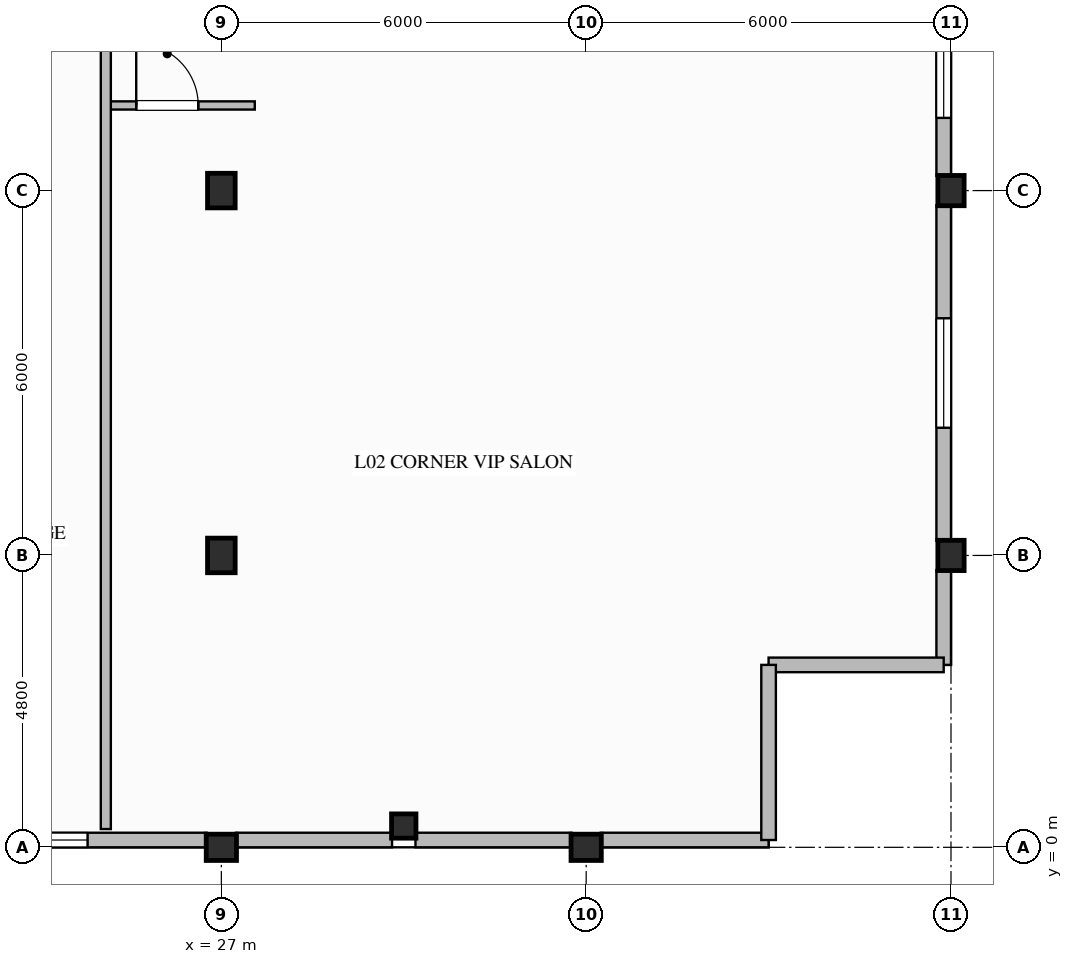
"""IFC4 building model, lengths in metres.
Left out: names, types, materials, properties, quantities, classifications, styles, units other than length and angle.
Written with IfcOpenShell. Run it as: python <this file> out.ifc"""

import sys

from ifc_helpers import new_model, si_unit, direction, frame, frame_2d, origin, origin_2d, place, context, subcontext, project, spatial, rectangle, i_section, extrude, element, fill, save


model = new_model("IFC4")
c1 = context("Model", 3, precision=1e-05, world=origin(), true_north=direction((0.0, 1.0)))
c2 = subcontext(c1, "Body", "Model", "MODEL_VIEW")
j1 = project(units=[si_unit("LENGTHUNIT", "METRE"), si_unit("PLANEANGLEUNIT", "RADIAN")], contexts=[c1])
p1 = place(None, origin())
s1 = spatial("IfcSite", under=j1, at=p1, CompositionType="ELEMENT")
p2 = place(p1, origin())
s2 = spatial("IfcBuilding", under=s1, at=p2, CompositionType="ELEMENT")
p3 = place(p2, frame((0.0, 0.0, 10.8)))
s3 = spatial("IfcBuildingStorey", under=s2, at=p3, CompositionType="ELEMENT", Elevation=10.8)
for number, where, z_axis, x_axis in (
    (1, (39.0, 4.8, 0.0), (0.0, 0.0, 1.0), (1.0, 0.0, 0.0)),
    (2, (39.0, 10.8, 0.0), (0.0, 0.0, 1.0), (1.0, 0.0, 0.0)),
    (3, (27.0, 0.0, 0.0), (0.0, 0.0, 1.0), (0.0, 1.0, 0.0)),
    (4, (33.0, 0.0, 0.0), (0.0, 0.0, 1.0), (0.0, 1.0, 0.0)),
):
    element("IfcColumn", number, at=place(p3, frame(where, z_axis=z_axis, x_axis=x_axis)), inside=s3, PredefinedType="COLUMN", context=c2, shape_type="SweptSolid", body=[
        extrude(i_section(OverallWidth=0.432, OverallDepth=0.498, WebThickness=0.056, FlangeThickness=0.089, FilletRadius=0.03, at=origin_2d()), origin(), (0.0, 0.0, 1.0), 6.4),
    ])
for number, where, z_axis, x_axis in (
    (5, (27.0, 4.8, 0.0), (0.0, 0.0, 1.0), (1.0, 0.0, 0.0)),
    (6, (27.0, 10.8, 0.0), (0.0, 0.0, 1.0), (1.0, 0.0, 0.0)),
):
    element("IfcColumn", number, at=place(p3, frame(where, z_axis=z_axis, x_axis=x_axis)), inside=s3, PredefinedType="COLUMN", context=c2, shape_type="SweptSolid", body=[
        extrude(i_section(OverallWidth=0.454, OverallDepth=0.569, WebThickness=0.078, FlangeThickness=0.125, FilletRadius=0.03, at=origin_2d()), origin(), (0.0, 0.0, 1.0), 6.4),
    ])
p4 = place(p3, frame((30.0, 0.35, 0.0), z_axis=(0.0, 0.0, 1.0), x_axis=(1.0, 0.0, 0.0)))
e7 = element("IfcColumn", 7, at=p4, inside=s3, PredefinedType="COLUMN", context=c2, shape_type="SweptSolid", body=[
    extrude(i_section(OverallWidth=0.401, OverallDepth=0.399, WebThickness=0.025, FlangeThickness=0.04, FilletRadius=0.025, at=origin_2d()), origin(), (0.0, 0.0, 1.0), 6.4),
])
p5 = place(p3, frame((38.88, 4.559, 0.0), z_axis=(0.0, 0.0, 1.0), x_axis=(0.0, -1.0, 0.0)))
e8 = element("IfcWall", 8, at=p5, inside=s3, PredefinedType="STANDARD", context=c2, shape_type="SweptSolid", body=[
    extrude(rectangle(XDim=1.559, YDim=0.24, at=frame_2d((0.78, 0.0))), origin(), (0.0, 0.0, 1.0), 6.1),
])
p6 = place(p3, frame((38.88, 10.559, 0.0), z_axis=(0.0, 0.0, 1.0), x_axis=(0.0, -1.0, 0.0)))
e9 = element("IfcWall", 9, at=p6, inside=s3, PredefinedType="STANDARD", context=c2, shape_type="SweptSolid", body=[
    extrude(rectangle(XDim=5.518, YDim=0.24, at=frame_2d((2.759, 0.0))), origin(), (0.0, 0.0, 1.0), 5.404),
])
p7 = place(p6, frame((1.859, 0.0, 0.85)))
e10 = element("IfcOpeningElement", 10, at=p7, cuts=e9, PredefinedType="OPENING", context=c2, shape_type="SweptSolid", body=[
    extrude(rectangle(XDim=1.8, YDim=2.2, at=frame_2d((0.9, 1.1))), frame((0.0, 0.13, 0.0), z_axis=(0.0, -1.0, 0.0), x_axis=(1.0, 0.0, 0.0)), (0.0, 0.0, 1.0), 0.26),
])
p8 = place(p3, frame((38.88, 14.75, 0.0), z_axis=(0.0, 0.0, 1.0), x_axis=(0.0, -1.0, 0.0)))
e11 = element("IfcWall", 11, at=p8, inside=s3, PredefinedType="STANDARD", context=c2, shape_type="SweptSolid", body=[
    extrude(rectangle(XDim=3.709, YDim=0.24, at=frame_2d((1.854, 0.0))), origin(), (0.0, 0.0, 1.0), 5.404),
])
p9 = place(p8, frame((0.955, 0.0, 0.85)))
e12 = element("IfcOpeningElement", 12, at=p9, cuts=e11, PredefinedType="OPENING", context=c2, shape_type="SweptSolid", body=[
    extrude(rectangle(XDim=1.8, YDim=2.2, at=frame_2d((0.9, 1.1))), frame((0.0, 0.13, 0.0), z_axis=(0.0, -1.0, 0.0), x_axis=(1.0, 0.0, 0.0)), (0.0, 0.0, 1.0), 0.26),
])
p10 = place(p3, frame((26.759, 0.12, 0.0), z_axis=(0.0, 0.0, 1.0), x_axis=(-1.0, 0.0, 0.0)))
e13 = element("IfcWall", 13, at=p10, inside=s3, PredefinedType="STANDARD", context=c2, shape_type="SweptSolid", body=[
    extrude(rectangle(XDim=4.318, YDim=0.24, at=frame_2d((2.159, 0.0))), origin(), (0.0, 0.0, 1.0), 5.404),
])
p11 = place(p10, frame((1.959, 0.0, 0.65)))
e14 = element("IfcOpeningElement", 14, at=p11, cuts=e13, PredefinedType="OPENING", context=c2, shape_type="SweptSolid", body=[
    extrude(rectangle(XDim=1.8, YDim=2.2, at=frame_2d((0.9, 1.1))), frame((0.0, 0.13, 0.0), z_axis=(0.0, -1.0, 0.0), x_axis=(1.0, 0.0, 0.0)), (0.0, 0.0, 1.0), 0.26),
])
for number, where, z_axis, x_axis in (
    (15, (29.807, 0.12, 0.0), (0.0, 0.0, 1.0), (-1.0, 0.0, 0.0)),
    (16, (32.759, 0.12, 0.0), (0.0, 0.0, 1.0), (-1.0, 0.0, 0.0)),
):
    element("IfcWall", number, at=place(p3, frame(where, z_axis=z_axis, x_axis=x_axis)), inside=s3, PredefinedType="STANDARD", context=c2, shape_type="SweptSolid", body=[
        extrude(rectangle(XDim=2.566, YDim=0.24, at=frame_2d((1.283, 0.0))), origin(), (0.0, 0.0, 1.0), 5.404),
    ])
p12 = place(p3, frame((36.0, 0.12, 0.0), z_axis=(0.0, 0.0, 1.0), x_axis=(-1.0, 0.0, 0.0)))
e17 = element("IfcWall", 17, at=p12, inside=s3, PredefinedType="STANDARD", context=c2, shape_type="SweptSolid", body=[
    extrude(rectangle(XDim=2.759, YDim=0.24, at=frame_2d((1.379, 0.0))), origin(), (0.0, 0.0, 1.0), 6.1),
])
for number, where, z_axis, x_axis in (
    (18, (38.88, 3.0, 0.0), (0.0, 0.0, 1.0), (-1.0, 0.0, 0.0)),
    (19, (36.0, 3.0, 0.0), (0.0, 0.0, 1.0), (0.0, -1.0, 0.0)),
):
    element("IfcWall", number, at=place(p3, frame(where, z_axis=z_axis, x_axis=x_axis)), inside=s3, PredefinedType="STANDARD", context=c2, shape_type="SweptSolid", body=[
        extrude(rectangle(XDim=2.88, YDim=0.24, at=frame_2d((1.44, 0.0))), origin(), (0.0, 0.0, 1.0), 6.1),
    ])
p13 = place(p3, frame((25.1, 12.2, 0.0), z_axis=(0.0, 0.0, 1.0), x_axis=(1.0, 0.0, 0.0)))
e20 = element("IfcWall", 20, at=p13, inside=s3, PredefinedType="PARTITIONING", context=c2, shape_type="SweptSolid", body=[
    extrude(rectangle(XDim=2.45, YDim=0.135, at=frame_2d((1.225, 0.0))), origin(), (0.0, 0.0, 1.0), 6.1),
])
p14 = place(p13, frame((0.5, 0.0, 0.0)))
e21 = element("IfcOpeningElement", 21, at=p14, cuts=e20, PredefinedType="OPENING", context=c2, shape_type="SweptSolid", body=[
    extrude(rectangle(XDim=1.02, YDim=2.15, at=frame_2d((0.51, 1.075))), frame((0.0, 0.077, 0.0), z_axis=(0.0, -1.0, 0.0), x_axis=(1.0, 0.0, 0.0)), (0.0, 0.0, 1.0), 0.155),
])
p15 = place(p3, frame((25.1, 0.3, 0.0), z_axis=(0.0, 0.0, 1.0), x_axis=(0.0, 1.0, 0.0)))
e22 = element("IfcWall", 22, at=p15, inside=s3, PredefinedType="PARTITIONING", context=c2, shape_type="SweptSolid", body=[
    extrude(rectangle(XDim=15.5, YDim=0.165, at=frame_2d((7.75, 0.0))), origin(), (0.0, 0.0, 1.0), 6.1),
])
p16 = place(p7, origin())
e23 = element("IfcWindow", 23, at=p16, inside=s3, PartitioningType="SINGLE_PANEL", PredefinedType="WINDOW", context=c2, shape_type="SweptSolid", body=[
    extrude(rectangle(XDim=1.8, YDim=2.2, at=frame_2d((0.9, 1.1))), frame((0.0, 0.03, 0.0), z_axis=(0.0, -1.0, 0.0), x_axis=(1.0, 0.0, 0.0)), (0.0, 0.0, 1.0), 0.06),
])
fill(e10, e23)
p17 = place(p9, origin())
e24 = element("IfcWindow", 24, at=p17, inside=s3, PartitioningType="SINGLE_PANEL", PredefinedType="WINDOW", context=c2, shape_type="SweptSolid", body=[
    extrude(rectangle(XDim=1.8, YDim=2.2, at=frame_2d((0.9, 1.1))), frame((0.0, 0.03, 0.0), z_axis=(0.0, -1.0, 0.0), x_axis=(1.0, 0.0, 0.0)), (0.0, 0.0, 1.0), 0.06),
])
fill(e12, e24)
p18 = place(p11, origin())
e25 = element("IfcWindow", 25, at=p18, inside=s3, PartitioningType="SINGLE_PANEL", PredefinedType="WINDOW", context=c2, shape_type="SweptSolid", body=[
    extrude(rectangle(XDim=1.8, YDim=2.2, at=frame_2d((0.9, 1.1))), frame((0.0, 0.03, 0.0), z_axis=(0.0, -1.0, 0.0), x_axis=(1.0, 0.0, 0.0)), (0.0, 0.0, 1.0), 0.06),
])
fill(e14, e25)
p19 = place(p14, origin())
e26 = element("IfcDoor", 26, at=p19, inside=s3, OperationType="SINGLE_SWING_LEFT", PredefinedType="DOOR", context=c2, shape_type="SweptSolid", body=[
    extrude(rectangle(XDim=1.02, YDim=2.15, at=frame_2d((0.51, 1.075))), frame((0.0, 0.025, 0.0), z_axis=(0.0, -1.0, 0.0), x_axis=(1.0, 0.0, 0.0)), (0.0, 0.0, 1.0), 0.05),
])
fill(e21, e26)
save(model, sys.argv[1])
